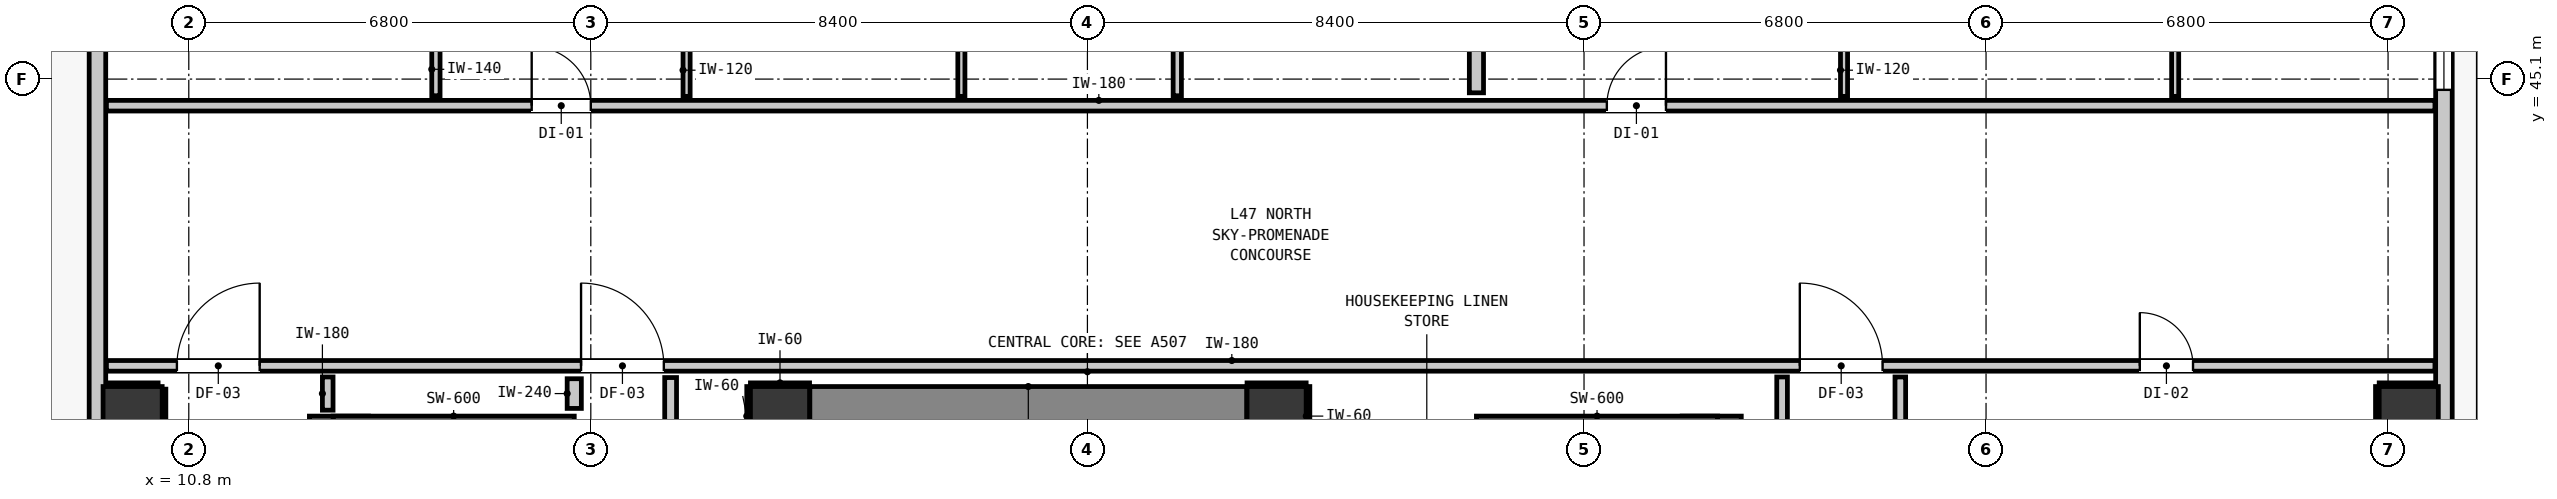
"""IFC4 building model, lengths in metres.
Left out: names, types, materials, properties, quantities, classifications, styles, units other than length and angle.
Written with IfcOpenShell. Run it as: python <this file> out.ifc"""

import sys

from ifc_helpers import new_model, si_unit, direction, frame, frame_2d, origin, origin_2d, place, context, subcontext, project, spatial, rectangle, extrude, element, fill, save


model = new_model("IFC4")
c1 = context("Model", 3, precision=1e-05, world=origin(), true_north=direction((0.0, 1.0)))
c2 = subcontext(c1, "Body", "Model", "MODEL_VIEW")
j1 = project(units=[si_unit("LENGTHUNIT", "METRE"), si_unit("PLANEANGLEUNIT", "RADIAN")], contexts=[c1])
p1 = place(None, origin())
s1 = spatial("IfcSite", under=j1, at=p1, CompositionType="ELEMENT")
p2 = place(p1, origin())
s2 = spatial("IfcBuilding", under=s1, at=p2, CompositionType="ELEMENT")
p3 = place(p2, frame((0.0, 0.0, 162.52)))
s3 = spatial("IfcBuildingStorey", under=s2, at=p3, CompositionType="ELEMENT", Elevation=162.52)
for number, where, z_axis, x_axis in (
    (1, (20.8, 39.4, 0.0), (0.0, 0.0, 1.0), (1.0, 0.0, 0.0)),
    (2, (29.2, 39.4, 0.0), (0.0, 0.0, 1.0), (1.0, 0.0, 0.0)),
):
    element("IfcColumn", number, at=place(p3, frame(where, z_axis=z_axis, x_axis=x_axis)), inside=s3, PredefinedType="COLUMN", context=c2, shape_type="SweptSolid", body=[
        extrude(rectangle(XDim=1.0, YDim=1.0, at=origin_2d()), origin(), (0.0, 0.0, 1.0), 3.32),
    ])
p4 = place(p3, frame((13.34, 31.205, 0.0), z_axis=(0.0, 0.0, 1.0), x_axis=(0.0, 1.0, 0.0)))
e3 = element("IfcWall", 3, at=p4, inside=s3, PredefinedType="SHEAR", context=c2, shape_type="SweptSolid", body=[
    extrude(rectangle(XDim=8.195, YDim=1.0, at=frame_2d((4.097, 0.0))), origin(), (0.0, 0.0, 1.0), 3.32),
])
p5 = place(p3, frame((13.24, 39.1, 0.0), z_axis=(0.0, 0.0, 1.0), x_axis=(1.0, 0.0, 0.0)))
e4 = element("IfcWall", 4, at=p5, inside=s3, PredefinedType="SHEAR", context=c2, shape_type="SweptSolid", body=[
    extrude(rectangle(XDim=4.08, YDim=0.6, at=frame_2d((2.04, 0.0))), origin(), (0.0, 0.0, 1.0), 3.32),
])
p6 = place(p3, frame((36.56, 31.205, 0.0), z_axis=(0.0, 0.0, 1.0), x_axis=(0.0, 1.0, 0.0)))
e5 = element("IfcWall", 5, at=p6, inside=s3, PredefinedType="SHEAR", context=c2, shape_type="SweptSolid", body=[
    extrude(rectangle(XDim=8.195, YDim=1.0, at=frame_2d((4.097, 0.0))), origin(), (0.0, 0.0, 1.0), 3.32),
])
p7 = place(p3, frame((32.58, 39.1, 0.0), z_axis=(0.0, 0.0, 1.0), x_axis=(1.0, 0.0, 0.0)))
e6 = element("IfcWall", 6, at=p7, inside=s3, PredefinedType="SHEAR", context=c2, shape_type="SweptSolid", body=[
    extrude(rectangle(XDim=4.08, YDim=0.6, at=frame_2d((2.04, 0.0))), origin(), (0.0, 0.0, 1.0), 3.32),
])
p8 = place(p3, frame((21.305, 39.4, 0.0), z_axis=(0.0, 0.0, 1.0), x_axis=(1.0, 0.0, 0.0)))
e7 = element("IfcWall", 7, at=p8, inside=s3, PredefinedType="SHEAR", context=c2, shape_type="SweptSolid", body=[
    extrude(rectangle(XDim=7.39, YDim=1.0, at=frame_2d((3.695, 0.0))), origin(), (0.0, 0.0, 1.0), 3.32),
])
for number, where, z_axis, x_axis in (
    (8, (9.85, 39.4, 0.0), (0.0, 0.0, 1.0), (1.0, 0.0, 0.0)),
    (9, (48.35, 39.4, 0.0), (0.0, 0.0, 1.0), (1.0, 0.0, 0.0)),
):
    element("IfcColumn", number, at=place(p3, frame(where, z_axis=z_axis, x_axis=x_axis)), inside=s3, PredefinedType="COLUMN", context=c2, shape_type="SweptSolid", body=[
        extrude(rectangle(XDim=1.0, YDim=1.0, at=origin_2d()), origin(), (0.0, 0.0, 1.0), 2.9),
    ])
p9 = place(p3, frame((9.255, 17.555, 0.0), z_axis=(0.0, 0.0, 1.0), x_axis=(0.0, 1.0, 0.0)))
e10 = element("IfcWall", 10, at=p9, inside=s3, PredefinedType="STANDARD", context=c2, shape_type="SweptSolid", body=[
    extrude(rectangle(XDim=32.29, YDim=0.28, at=frame_2d((16.145, 0.0))), origin(), (0.0, 0.0, 1.0), 2.9),
])
p10 = place(p9, frame((5.467, 0.0, 0.0)))
e11 = element("IfcOpeningElement", 11, at=p10, cuts=e10, PredefinedType="OPENING", context=c2, shape_type="SweptSolid", body=[
    extrude(rectangle(XDim=1.0, YDim=2.15, at=frame_2d((0.5, 1.075))), frame((0.0, 0.15, 0.0), z_axis=(0.0, -1.0, 0.0), x_axis=(1.0, 0.0, 0.0)), (0.0, 0.0, 1.0), 0.3),
])
p11 = place(p9, frame((0.342, 0.0, 0.85)))
e12 = element("IfcOpeningElement", 12, at=p11, cuts=e10, PredefinedType="OPENING", context=c2, shape_type="SweptSolid", body=[
    extrude(rectangle(XDim=1.2, YDim=1.8, at=frame_2d((0.6, 0.9))), frame((0.0, 0.15, 0.0), z_axis=(0.0, -1.0, 0.0), x_axis=(1.0, 0.0, 0.0)), (0.0, 0.0, 1.0), 0.3),
])
p12 = place(p9, frame((30.677, 0.0, 0.85)))
e13 = element("IfcOpeningElement", 13, at=p12, cuts=e10, PredefinedType="OPENING", context=c2, shape_type="SweptSolid", body=[
    extrude(rectangle(XDim=1.2, YDim=1.8, at=frame_2d((0.6, 0.9))), frame((0.0, 0.15, 0.0), z_axis=(0.0, -1.0, 0.0), x_axis=(1.0, 0.0, 0.0)), (0.0, 0.0, 1.0), 0.3),
])
p13 = place(p3, frame((48.945, 49.845, 0.0), z_axis=(0.0, 0.0, 1.0), x_axis=(0.0, -1.0, 0.0)))
e14 = element("IfcWall", 14, at=p13, inside=s3, PredefinedType="STANDARD", context=c2, shape_type="SweptSolid", body=[
    extrude(rectangle(XDim=32.29, YDim=0.28, at=frame_2d((16.145, 0.0))), origin(), (0.0, 0.0, 1.0), 2.9),
])
p14 = place(p13, frame((2.659, 0.0, 0.0)))
e15 = element("IfcOpeningElement", 15, at=p14, cuts=e14, PredefinedType="OPENING", context=c2, shape_type="SweptSolid", body=[
    extrude(rectangle(XDim=1.0, YDim=2.15, at=frame_2d((0.5, 1.075))), frame((0.0, 0.15, 0.0), z_axis=(0.0, -1.0, 0.0), x_axis=(1.0, 0.0, 0.0)), (0.0, 0.0, 1.0), 0.3),
])
p15 = place(p13, frame((30.747, 0.0, 0.85)))
e16 = element("IfcOpeningElement", 16, at=p15, cuts=e14, PredefinedType="OPENING", context=c2, shape_type="SweptSolid", body=[
    extrude(rectangle(XDim=1.2, YDim=1.8, at=frame_2d((0.6, 0.9))), frame((0.0, 0.15, 0.0), z_axis=(0.0, -1.0, 0.0), x_axis=(1.0, 0.0, 0.0)), (0.0, 0.0, 1.0), 0.3),
])
p16 = place(p13, frame((4.027, 0.0, 0.85)))
e17 = element("IfcOpeningElement", 17, at=p16, cuts=e14, PredefinedType="OPENING", context=c2, shape_type="SweptSolid", body=[
    extrude(rectangle(XDim=0.9, YDim=1.5, at=frame_2d((0.45, 0.75))), frame((0.0, 0.15, 0.0), z_axis=(0.0, -1.0, 0.0), x_axis=(1.0, 0.0, 0.0)), (0.0, 0.0, 1.0), 0.3),
])
p17 = place(p13, frame((0.412, 0.0, 0.85)))
e18 = element("IfcOpeningElement", 18, at=p17, cuts=e14, PredefinedType="OPENING", context=c2, shape_type="SweptSolid", body=[
    extrude(rectangle(XDim=1.2, YDim=1.8, at=frame_2d((0.6, 0.9))), frame((0.0, 0.15, 0.0), z_axis=(0.0, -1.0, 0.0), x_axis=(1.0, 0.0, 0.0)), (0.0, 0.0, 1.0), 0.3),
])
p18 = place(p13, frame((22.895, 0.0, 0.85)))
e19 = element("IfcOpeningElement", 19, at=p18, cuts=e14, PredefinedType="OPENING", context=c2, shape_type="SweptSolid", body=[
    extrude(rectangle(XDim=1.2, YDim=1.8, at=frame_2d((0.6, 0.9))), frame((0.0, 0.15, 0.0), z_axis=(0.0, -1.0, 0.0), x_axis=(1.0, 0.0, 0.0)), (0.0, 0.0, 1.0), 0.3),
])
p19 = place(p3, frame((9.407, 40.25, 0.0), z_axis=(0.0, 0.0, 1.0), x_axis=(1.0, 0.0, 0.0)))
e20 = element("IfcWall", 20, at=p19, inside=s3, PredefinedType="PARTITIONING", context=c2, shape_type="SweptSolid", body=[
    extrude(rectangle(XDim=39.386, YDim=0.18, at=frame_2d((19.693, 0.0))), origin(), (0.0, 0.0, 1.0), 2.9),
])
p20 = place(p19, frame((8.028, 0.0, 0.0)))
e21 = element("IfcOpeningElement", 21, at=p20, cuts=e20, PredefinedType="OPENING", context=c2, shape_type="SweptSolid", body=[
    extrude(rectangle(XDim=1.4, YDim=2.15, at=frame_2d((0.7, 1.075))), frame((0.0, 0.1, 0.0), z_axis=(0.0, -1.0, 0.0), x_axis=(1.0, 0.0, 0.0)), (0.0, 0.0, 1.0), 0.2),
])
p21 = place(p19, frame((1.192, 0.0, 0.0)))
e22 = element("IfcOpeningElement", 22, at=p21, cuts=e20, PredefinedType="OPENING", context=c2, shape_type="SweptSolid", body=[
    extrude(rectangle(XDim=1.4, YDim=2.15, at=frame_2d((0.7, 1.075))), frame((0.0, 0.1, 0.0), z_axis=(0.0, -1.0, 0.0), x_axis=(1.0, 0.0, 0.0)), (0.0, 0.0, 1.0), 0.2),
])
p22 = place(p19, frame((28.643, 0.0, 0.0)))
e23 = element("IfcOpeningElement", 23, at=p22, cuts=e20, PredefinedType="OPENING", context=c2, shape_type="SweptSolid", body=[
    extrude(rectangle(XDim=1.4, YDim=2.15, at=frame_2d((0.7, 1.075))), frame((0.0, 0.1, 0.0), z_axis=(0.0, -1.0, 0.0), x_axis=(1.0, 0.0, 0.0)), (0.0, 0.0, 1.0), 0.2),
])
p23 = place(p19, frame((34.394, 0.0, 0.0)))
e24 = element("IfcOpeningElement", 24, at=p23, cuts=e20, PredefinedType="OPENING", context=c2, shape_type="SweptSolid", body=[
    extrude(rectangle(XDim=0.9, YDim=2.1, at=frame_2d((0.45, 1.05))), frame((0.0, 0.1, 0.0), z_axis=(0.0, -1.0, 0.0), x_axis=(1.0, 0.0, 0.0)), (0.0, 0.0, 1.0), 0.2),
])
p24 = place(p3, frame((9.407, 44.65, 0.0), z_axis=(0.0, 0.0, 1.0), x_axis=(1.0, 0.0, 0.0)))
e25 = element("IfcWall", 25, at=p24, inside=s3, PredefinedType="PARTITIONING", context=c2, shape_type="SweptSolid", body=[
    extrude(rectangle(XDim=39.386, YDim=0.18, at=frame_2d((19.693, 0.0))), origin(), (0.0, 0.0, 1.0), 2.9),
])
p25 = place(p24, frame((7.193, 0.0, 0.0)))
e26 = element("IfcOpeningElement", 26, at=p25, cuts=e25, PredefinedType="OPENING", context=c2, shape_type="SweptSolid", body=[
    extrude(rectangle(XDim=1.0, YDim=2.15, at=frame_2d((0.5, 1.075))), frame((0.0, 0.1, 0.0), z_axis=(0.0, -1.0, 0.0), x_axis=(1.0, 0.0, 0.0)), (0.0, 0.0, 1.0), 0.2),
])
p26 = place(p24, frame((25.379, 0.0, 0.0)))
e27 = element("IfcOpeningElement", 27, at=p26, cuts=e25, PredefinedType="OPENING", context=c2, shape_type="SweptSolid", body=[
    extrude(rectangle(XDim=1.0, YDim=2.15, at=frame_2d((0.5, 1.075))), frame((0.0, 0.1, 0.0), z_axis=(0.0, -1.0, 0.0), x_axis=(1.0, 0.0, 0.0)), (0.0, 0.0, 1.0), 0.2),
])
p27 = place(p3, frame((17.32, 39.53, 0.0), z_axis=(0.0, 0.0, 1.0), x_axis=(0.0, 1.0, 0.0)))
e28 = element("IfcWall", 28, at=p27, inside=s3, PredefinedType="PARTITIONING", context=c2, shape_type="SweptSolid", body=[
    extrude(rectangle(XDim=0.502, YDim=0.24, at=frame_2d((0.251, 0.0))), origin(), (0.0, 0.0, 1.0), 2.9),
])
p28 = place(p3, frame((32.58, 44.868, 0.0), z_axis=(0.0, 0.0, 1.0), x_axis=(0.0, 1.0, 0.0)))
e29 = element("IfcWall", 29, at=p28, inside=s3, PredefinedType="PARTITIONING", context=c2, shape_type="SweptSolid", body=[
    extrude(rectangle(XDim=7.125, YDim=0.24, at=frame_2d((3.562, 0.0))), origin(), (0.0, 0.0, 1.0), 2.9),
])
p29 = place(p28, frame((0.945, 0.0, 0.0)))
e30 = element("IfcOpeningElement", 30, at=p29, cuts=e29, PredefinedType="OPENING", context=c2, shape_type="SweptSolid", body=[
    extrude(rectangle(XDim=0.86, YDim=2.02, at=frame_2d((0.43, 1.01))), frame((0.0, 0.13, 0.0), z_axis=(0.0, -1.0, 0.0), x_axis=(1.0, 0.0, 0.0)), (0.0, 0.0, 1.0), 0.26),
])
p30 = place(p28, frame((4.574, 0.0, 0.0)))
e31 = element("IfcOpeningElement", 31, at=p30, cuts=e29, PredefinedType="OPENING", context=c2, shape_type="SweptSolid", body=[
    extrude(rectangle(XDim=0.9, YDim=2.1, at=frame_2d((0.45, 1.05))), frame((0.0, 0.13, 0.0), z_axis=(0.0, -1.0, 0.0), x_axis=(1.0, 0.0, 0.0)), (0.0, 0.0, 1.0), 0.26),
])
p31 = place(p3, frame((18.95, 38.918, 0.0), z_axis=(0.0, 0.0, 1.0), x_axis=(0.0, 1.0, 0.0)))
e32 = element("IfcWall", 32, at=p31, inside=s3, PredefinedType="PARTITIONING", context=c2, shape_type="SweptSolid", body=[
    extrude(rectangle(XDim=1.134, YDim=0.2, at=frame_2d((0.567, 0.0))), origin(), (0.0, 0.0, 1.0), 2.9),
])
p32 = place(p3, frame((13.15, 39.5, 0.0), z_axis=(0.0, 0.0, 1.0), x_axis=(0.0, 1.0, 0.0)))
e33 = element("IfcWall", 33, at=p32, inside=s3, PredefinedType="PARTITIONING", context=c2, shape_type="SweptSolid", body=[
    extrude(rectangle(XDim=0.562, YDim=0.18, at=frame_2d((0.281, 0.0))), origin(), (0.0, 0.0, 1.0), 0.905),
])
p33 = place(p3, frame((37.75, 21.368, 0.0), z_axis=(0.0, 0.0, 1.0), x_axis=(0.0, 1.0, 0.0)))
e34 = element("IfcWall", 34, at=p33, inside=s3, PredefinedType="PARTITIONING", context=c2, shape_type="SweptSolid", body=[
    extrude(rectangle(XDim=18.694, YDim=0.18, at=frame_2d((9.347, 0.0))), origin(), (0.0, 0.0, 1.0), 2.9),
])
p34 = place(p3, frame((39.75, 36.238, 0.0), z_axis=(0.0, 0.0, 1.0), x_axis=(0.0, 1.0, 0.0)))
e35 = element("IfcWall", 35, at=p34, inside=s3, PredefinedType="PARTITIONING", context=c2, shape_type="SweptSolid", body=[
    extrude(rectangle(XDim=3.824, YDim=0.18, at=frame_2d((1.912, 0.0))), origin(), (0.0, 0.0, 1.0), 2.9),
])
p35 = place(p3, frame((14.98, 44.818, 0.0), z_axis=(0.0, 0.0, 1.0), x_axis=(0.0, 1.0, 0.0)))
e36 = element("IfcWall", 36, at=p35, inside=s3, PredefinedType="PARTITIONING", context=c2, shape_type="SweptSolid", body=[
    extrude(rectangle(XDim=2.844, YDim=0.14, at=frame_2d((1.422, 0.0))), origin(), (0.0, 0.0, 1.0), 2.9),
])
p36 = place(p35, frame((0.995, 0.0, 0.0)))
e37 = element("IfcOpeningElement", 37, at=p36, cuts=e36, PredefinedType="OPENING", context=c2, shape_type="SweptSolid", body=[
    extrude(rectangle(XDim=0.86, YDim=2.02, at=frame_2d((0.43, 1.01))), frame((0.0, 0.08, 0.0), z_axis=(0.0, -1.0, 0.0), x_axis=(1.0, 0.0, 0.0)), (0.0, 0.0, 1.0), 0.16),
])
p37 = place(p3, frame((27.52, 44.818, 0.0), z_axis=(0.0, 0.0, 1.0), x_axis=(0.0, 1.0, 0.0)))
e38 = element("IfcWall", 38, at=p37, inside=s3, PredefinedType="PARTITIONING", context=c2, shape_type="SweptSolid", body=[
    extrude(rectangle(XDim=2.844, YDim=0.14, at=frame_2d((1.422, 0.0))), origin(), (0.0, 0.0, 1.0), 2.9),
])
p38 = place(p3, frame((19.22, 44.808, 0.0), z_axis=(0.0, 0.0, 1.0), x_axis=(0.0, 1.0, 0.0)))
e39 = element("IfcWall", 39, at=p38, inside=s3, PredefinedType="PARTITIONING", context=c2, shape_type="SweptSolid", body=[
    extrude(rectangle(XDim=2.864, YDim=0.12, at=frame_2d((1.432, 0.0))), origin(), (0.0, 0.0, 1.0), 2.9),
])
p39 = place(p38, frame((0.985, 0.0, 0.0)))
e40 = element("IfcOpeningElement", 40, at=p39, cuts=e39, PredefinedType="OPENING", context=c2, shape_type="SweptSolid", body=[
    extrude(rectangle(XDim=0.9, YDim=2.1, at=frame_2d((0.45, 1.05))), frame((0.0, 0.07, 0.0), z_axis=(0.0, -1.0, 0.0), x_axis=(1.0, 0.0, 0.0)), (0.0, 0.0, 1.0), 0.14),
])
p40 = place(p3, frame((23.868, 44.808, 0.0), z_axis=(0.0, 0.0, 1.0), x_axis=(0.0, 1.0, 0.0)))
e41 = element("IfcWall", 41, at=p40, inside=s3, PredefinedType="PARTITIONING", context=c2, shape_type="SweptSolid", body=[
    extrude(rectangle(XDim=2.864, YDim=0.12, at=frame_2d((1.432, 0.0))), origin(), (0.0, 0.0, 1.0), 2.9),
])
p41 = place(p40, frame((0.972, 0.0, 0.0)))
e42 = element("IfcOpeningElement", 42, at=p41, cuts=e41, PredefinedType="OPENING", context=c2, shape_type="SweptSolid", body=[
    extrude(rectangle(XDim=0.9, YDim=2.1, at=frame_2d((0.45, 1.05))), frame((0.0, 0.07, 0.0), z_axis=(0.0, -1.0, 0.0), x_axis=(1.0, 0.0, 0.0)), (0.0, 0.0, 1.0), 0.14),
])
p42 = place(p3, frame((38.798, 44.808, 0.0), z_axis=(0.0, 0.0, 1.0), x_axis=(0.0, 1.0, 0.0)))
e43 = element("IfcWall", 43, at=p42, inside=s3, PredefinedType="PARTITIONING", context=c2, shape_type="SweptSolid", body=[
    extrude(rectangle(XDim=2.864, YDim=0.12, at=frame_2d((1.432, 0.0))), origin(), (0.0, 0.0, 1.0), 2.9),
])
p43 = place(p42, frame((0.985, 0.0, 0.0)))
e44 = element("IfcOpeningElement", 44, at=p43, cuts=e43, PredefinedType="OPENING", context=c2, shape_type="SweptSolid", body=[
    extrude(rectangle(XDim=0.9, YDim=2.1, at=frame_2d((0.45, 1.05))), frame((0.0, 0.07, 0.0), z_axis=(0.0, -1.0, 0.0), x_axis=(1.0, 0.0, 0.0)), (0.0, 0.0, 1.0), 0.14),
])
p44 = place(p3, frame((44.399, 44.808, 0.0), z_axis=(0.0, 0.0, 1.0), x_axis=(0.0, 1.0, 0.0)))
e45 = element("IfcWall", 45, at=p44, inside=s3, PredefinedType="PARTITIONING", context=c2, shape_type="SweptSolid", body=[
    extrude(rectangle(XDim=2.864, YDim=0.12, at=frame_2d((1.432, 0.0))), origin(), (0.0, 0.0, 1.0), 2.9),
])
p45 = place(p44, frame((0.972, 0.0, 0.0)))
e46 = element("IfcOpeningElement", 46, at=p45, cuts=e45, PredefinedType="OPENING", context=c2, shape_type="SweptSolid", body=[
    extrude(rectangle(XDim=0.9, YDim=2.1, at=frame_2d((0.45, 1.05))), frame((0.0, 0.07, 0.0), z_axis=(0.0, -1.0, 0.0), x_axis=(1.0, 0.0, 0.0)), (0.0, 0.0, 1.0), 0.14),
])
for number, where, z_axis, x_axis in (
    (47, (20.3, 39.932, 0.0), (0.0, 0.0, 1.0), (1.0, 0.0, 0.0)),
    (48, (20.268, 38.9, 0.0), (0.0, 0.0, 1.0), (0.0, 1.0, 0.0)),
    (49, (28.7, 39.932, 0.0), (0.0, 0.0, 1.0), (1.0, 0.0, 0.0)),
    (50, (29.732, 38.9, 0.0), (0.0, 0.0, 1.0), (0.0, 1.0, 0.0)),
):
    element("IfcWall", number, at=place(p3, frame(where, z_axis=z_axis, x_axis=x_axis)), inside=s3, PredefinedType="PARTITIONING", context=c2, shape_type="SweptSolid", body=[
        extrude(rectangle(XDim=1.0, YDim=0.06, at=frame_2d((0.5, 0.0))), origin(), (0.0, 0.0, 1.0), 0.905),
    ])
p46 = place(p3, frame((9.41, 39.932, 0.0), z_axis=(0.0, 0.0, 1.0), x_axis=(1.0, 0.0, 0.0)))
e51 = element("IfcWall", 51, at=p46, inside=s3, PredefinedType="PARTITIONING", context=c2, shape_type="SweptSolid", body=[
    extrude(rectangle(XDim=0.871, YDim=0.06, at=frame_2d((0.436, 0.0))), origin(), (0.0, 0.0, 1.0), 0.905),
])
p47 = place(p3, frame((10.382, 38.9, 0.0), z_axis=(0.0, 0.0, 1.0), x_axis=(0.0, 1.0, 0.0)))
e52 = element("IfcWall", 52, at=p47, inside=s3, PredefinedType="PARTITIONING", context=c2, shape_type="SweptSolid", body=[
    extrude(rectangle(XDim=0.956, YDim=0.06, at=frame_2d((0.478, 0.0))), origin(), (0.0, 0.0, 1.0), 1.45),
])
p48 = place(p3, frame((47.85, 39.932, 0.0), z_axis=(0.0, 0.0, 1.0), x_axis=(1.0, 0.0, 0.0)))
e53 = element("IfcWall", 53, at=p48, inside=s3, PredefinedType="PARTITIONING", context=c2, shape_type="SweptSolid", body=[
    extrude(rectangle(XDim=0.94, YDim=0.06, at=frame_2d((0.47, 0.0))), origin(), (0.0, 0.0, 1.0), 0.905),
])
p49 = place(p3, frame((47.818, 38.9, 0.0), z_axis=(0.0, 0.0, 1.0), x_axis=(0.0, 1.0, 0.0)))
e54 = element("IfcWall", 54, at=p49, inside=s3, PredefinedType="PARTITIONING", context=c2, shape_type="SweptSolid", body=[
    extrude(rectangle(XDim=1.0, YDim=0.06, at=frame_2d((0.5, 0.0))), origin(), (0.0, 0.0, 1.0), 1.45),
])
p50 = place(p16, origin())
e55 = element("IfcWindow", 55, at=p50, inside=s3, PartitioningType="SINGLE_PANEL", PredefinedType="WINDOW", context=c2, shape_type="SweptSolid", body=[
    extrude(rectangle(XDim=0.9, YDim=1.5, at=frame_2d((0.45, 0.75))), frame((0.0, 0.03, 0.0), z_axis=(0.0, -1.0, 0.0), x_axis=(1.0, 0.0, 0.0)), (0.0, 0.0, 1.0), 0.06),
])
fill(e17, e55)
p51 = place(p20, origin())
e56 = element("IfcDoor", 56, at=p51, inside=s3, OperationType="SINGLE_SWING_LEFT", PredefinedType="DOOR", context=c2, shape_type="SweptSolid", body=[
    extrude(rectangle(XDim=1.4, YDim=2.15, at=frame_2d((0.7, 1.075))), frame((0.0, 0.025, 0.0), z_axis=(0.0, -1.0, 0.0), x_axis=(1.0, 0.0, 0.0)), (0.0, 0.0, 1.0), 0.05),
])
fill(e21, e56)
p52 = place(p21, origin())
e57 = element("IfcDoor", 57, at=p52, inside=s3, OperationType="SINGLE_SWING_RIGHT", PredefinedType="DOOR", context=c2, shape_type="SweptSolid", body=[
    extrude(rectangle(XDim=1.4, YDim=2.15, at=frame_2d((0.7, 1.075))), frame((0.0, 0.025, 0.0), z_axis=(0.0, -1.0, 0.0), x_axis=(1.0, 0.0, 0.0)), (0.0, 0.0, 1.0), 0.05),
])
fill(e22, e57)
p53 = place(p22, origin())
e58 = element("IfcDoor", 58, at=p53, inside=s3, OperationType="SINGLE_SWING_LEFT", PredefinedType="DOOR", context=c2, shape_type="SweptSolid", body=[
    extrude(rectangle(XDim=1.4, YDim=2.15, at=frame_2d((0.7, 1.075))), frame((0.0, 0.025, 0.0), z_axis=(0.0, -1.0, 0.0), x_axis=(1.0, 0.0, 0.0)), (0.0, 0.0, 1.0), 0.05),
])
fill(e23, e58)
p54 = place(p25, origin())
e59 = element("IfcDoor", 59, at=p54, inside=s3, OperationType="SINGLE_SWING_LEFT", PredefinedType="DOOR", context=c2, shape_type="SweptSolid", body=[
    extrude(rectangle(XDim=1.0, YDim=2.15, at=frame_2d((0.5, 1.075))), frame((0.0, 0.025, 0.0), z_axis=(0.0, -1.0, 0.0), x_axis=(1.0, 0.0, 0.0)), (0.0, 0.0, 1.0), 0.05),
])
fill(e26, e59)
p55 = place(p26, origin())
e60 = element("IfcDoor", 60, at=p55, inside=s3, OperationType="SINGLE_SWING_RIGHT", PredefinedType="DOOR", context=c2, shape_type="SweptSolid", body=[
    extrude(rectangle(XDim=1.0, YDim=2.15, at=frame_2d((0.5, 1.075))), frame((0.0, 0.025, 0.0), z_axis=(0.0, -1.0, 0.0), x_axis=(1.0, 0.0, 0.0)), (0.0, 0.0, 1.0), 0.05),
])
fill(e27, e60)
p56 = place(p23, origin())
e61 = element("IfcDoor", 61, at=p56, inside=s3, OperationType="SINGLE_SWING_LEFT", PredefinedType="DOOR", context=c2, shape_type="SweptSolid", body=[
    extrude(rectangle(XDim=0.9, YDim=2.1, at=frame_2d((0.45, 1.05))), frame((0.0, 0.025, 0.0), z_axis=(0.0, -1.0, 0.0), x_axis=(1.0, 0.0, 0.0)), (0.0, 0.0, 1.0), 0.05),
])
fill(e24, e61)
save(model, sys.argv[1])
